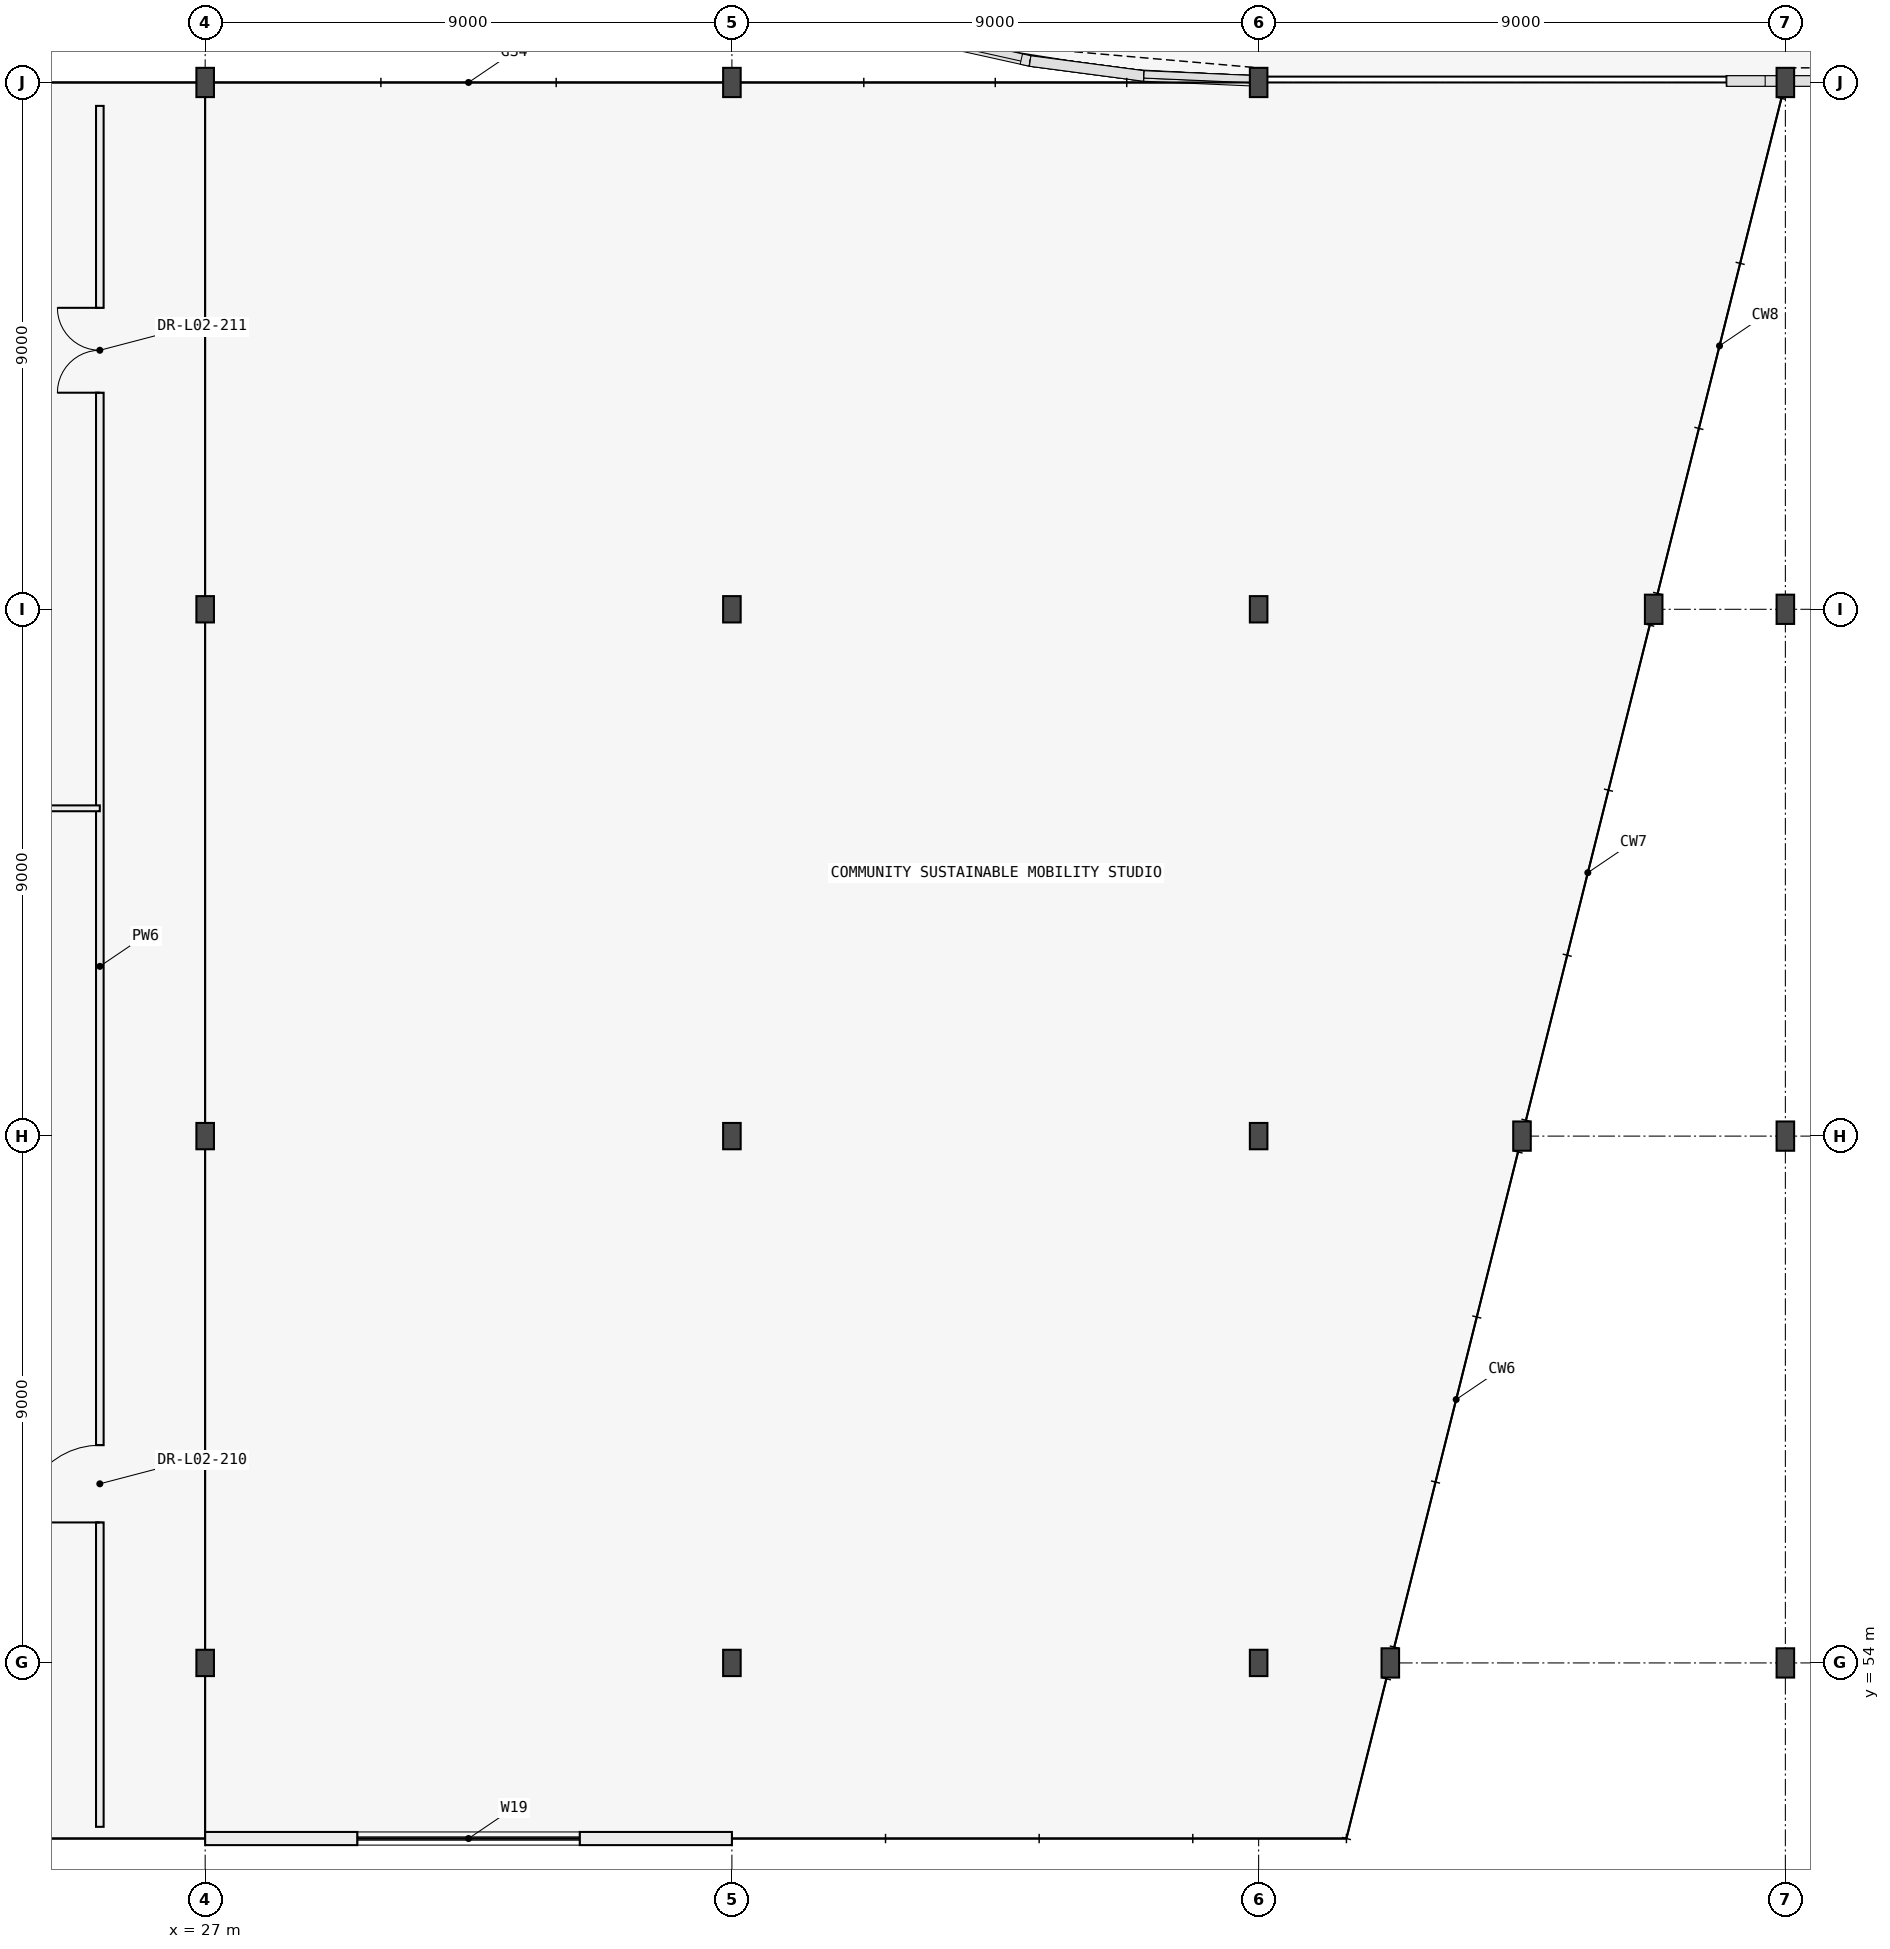
"""IFC4 building model, lengths in metres.
Left out: names, types, materials, properties, quantities, classifications, styles, units other than length and angle.
Written with IfcOpenShell. Run it as: python <this file> out.ifc"""

import sys

from ifc_helpers import new_model, si_unit, direction, frame, frame_2d, origin, origin_2d, place, context, subcontext, project, spatial, rectangle, i_section, extrude, element, fill, save


model = new_model("IFC4")
c1 = context("Model", 3, precision=1e-05, world=origin(), true_north=direction((0.0, 1.0)))
c2 = subcontext(c1, "Body", "Model", "MODEL_VIEW")
j1 = project(units=[si_unit("LENGTHUNIT", "METRE"), si_unit("PLANEANGLEUNIT", "RADIAN")], contexts=[c1])
p1 = place(None, origin())
s1 = spatial("IfcSite", under=j1, at=p1, CompositionType="ELEMENT")
p2 = place(p1, origin())
s2 = spatial("IfcBuilding", under=s1, at=p2, CompositionType="ELEMENT")
p3 = place(p2, frame((0.0, 0.0, 8.4)))
s3 = spatial("IfcBuildingStorey", under=s2, at=p3, CompositionType="ELEMENT", Elevation=8.4)
for number, where, z_axis, x_axis in (
    (1, (27.0, 54.0, 0.0), (0.0, 0.0, 1.0), (1.0, 0.0, 0.0)),
    (2, (36.0, 54.0, 0.0), (0.0, 0.0, 1.0), (1.0, 0.0, 0.0)),
    (3, (45.0, 54.0, 0.0), (0.0, 0.0, 1.0), (1.0, 0.0, 0.0)),
):
    element("IfcColumn", number, at=place(p3, frame(where, z_axis=z_axis, x_axis=x_axis)), inside=s3, PredefinedType="COLUMN", context=c2, shape_type="SweptSolid", body=[
        extrude(i_section(OverallWidth=0.3, OverallDepth=0.45, WebThickness=0.014, FlangeThickness=0.026, FilletRadius=0.027, at=origin_2d()), origin(), (0.0, 0.0, 1.0), 4.2),
    ])
p4 = place(p3, frame((47.25, 54.0, 0.0), z_axis=(0.0, 0.0, 1.0), x_axis=(1.0, 0.0, 0.0)))
e4 = element("IfcColumn", 4, at=p4, inside=s3, PredefinedType="COLUMN", context=c2, shape_type="SweptSolid", body=[
    extrude(i_section(OverallWidth=0.3, OverallDepth=0.5, WebThickness=0.014, FlangeThickness=0.028, FilletRadius=0.027, at=origin_2d()), origin(), (0.0, 0.0, 1.0), 4.2),
])
for number, where, z_axis, x_axis in (
    (5, (27.0, 63.0, 0.0), (0.0, 0.0, 1.0), (1.0, 0.0, 0.0)),
    (6, (36.0, 63.0, 0.0), (0.0, 0.0, 1.0), (1.0, 0.0, 0.0)),
    (7, (45.0, 63.0, 0.0), (0.0, 0.0, 1.0), (1.0, 0.0, 0.0)),
):
    element("IfcColumn", number, at=place(p3, frame(where, z_axis=z_axis, x_axis=x_axis)), inside=s3, PredefinedType="COLUMN", context=c2, shape_type="SweptSolid", body=[
        extrude(i_section(OverallWidth=0.3, OverallDepth=0.45, WebThickness=0.014, FlangeThickness=0.026, FilletRadius=0.027, at=origin_2d()), origin(), (0.0, 0.0, 1.0), 4.2),
    ])
p5 = place(p3, frame((49.5, 63.0, 0.0), z_axis=(0.0, 0.0, 1.0), x_axis=(1.0, 0.0, 0.0)))
e8 = element("IfcColumn", 8, at=p5, inside=s3, PredefinedType="COLUMN", context=c2, shape_type="SweptSolid", body=[
    extrude(i_section(OverallWidth=0.3, OverallDepth=0.5, WebThickness=0.014, FlangeThickness=0.028, FilletRadius=0.027, at=origin_2d()), origin(), (0.0, 0.0, 1.0), 4.2),
])
for number, where, z_axis, x_axis in (
    (9, (27.0, 72.0, 0.0), (0.0, 0.0, 1.0), (1.0, 0.0, 0.0)),
    (10, (36.0, 72.0, 0.0), (0.0, 0.0, 1.0), (1.0, 0.0, 0.0)),
    (11, (45.0, 72.0, 0.0), (0.0, 0.0, 1.0), (1.0, 0.0, 0.0)),
):
    element("IfcColumn", number, at=place(p3, frame(where, z_axis=z_axis, x_axis=x_axis)), inside=s3, PredefinedType="COLUMN", context=c2, shape_type="SweptSolid", body=[
        extrude(i_section(OverallWidth=0.3, OverallDepth=0.45, WebThickness=0.014, FlangeThickness=0.026, FilletRadius=0.027, at=origin_2d()), origin(), (0.0, 0.0, 1.0), 4.2),
    ])
for number, where, z_axis, x_axis in (
    (12, (51.75, 72.0, 0.0), (0.0, 0.0, 1.0), (1.0, 0.0, 0.0)),
    (13, (27.0, 81.0, 0.0), (0.0, 0.0, 1.0), (1.0, 0.0, 0.0)),
    (14, (36.0, 81.0, 0.0), (0.0, 0.0, 1.0), (1.0, 0.0, 0.0)),
    (15, (45.0, 81.0, 0.0), (0.0, 0.0, 1.0), (1.0, 0.0, 0.0)),
    (16, (54.0, 81.0, 0.0), (0.0, 0.0, 1.0), (1.0, 0.0, 0.0)),
    (17, (54.0, 54.0, 0.0), (0.0, 0.0, 1.0), (1.0, 0.0, 0.0)),
    (18, (54.0, 63.0, 0.0), (0.0, 0.0, 1.0), (1.0, 0.0, 0.0)),
    (19, (54.0, 72.0, 0.0), (0.0, 0.0, 1.0), (1.0, 0.0, 0.0)),
):
    element("IfcColumn", number, at=place(p3, frame(where, z_axis=z_axis, x_axis=x_axis)), inside=s3, PredefinedType="COLUMN", context=c2, shape_type="SweptSolid", body=[
        extrude(i_section(OverallWidth=0.3, OverallDepth=0.5, WebThickness=0.014, FlangeThickness=0.028, FilletRadius=0.027, at=origin_2d()), origin(), (0.0, 0.0, 1.0), 4.2),
    ])
p6 = place(p3, frame((27.0, 51.0, 0.0), z_axis=(0.0, 0.0, 1.0), x_axis=(1.0, 0.0, 0.0)))
e20 = element("IfcWall", 20, at=p6, inside=s3, PredefinedType="STANDARD", context=c2, shape_type="SweptSolid", body=[
    extrude(rectangle(XDim=9.0, YDim=0.225, at=frame_2d((4.5, 0.0))), origin(), (0.0, 0.0, 1.0), 3.935),
])
p7 = place(p6, frame((2.6, 0.0, 0.95)))
e21 = element("IfcOpeningElement", 21, at=p7, cuts=e20, PredefinedType="OPENING", context=c2, shape_type="SweptSolid", body=[
    extrude(rectangle(XDim=3.8, YDim=1.4, at=frame_2d((1.9, 0.7))), frame((0.0, 0.123, 0.0), z_axis=(0.0, -1.0, 0.0), x_axis=(1.0, 0.0, 0.0)), (0.0, 0.0, 1.0), 0.245),
])
p8 = place(p3, frame((25.2, 51.2, 0.0), z_axis=(0.0, 0.0, 1.0), x_axis=(0.0, 1.0, 0.0)))
e22 = element("IfcWall", 22, at=p8, inside=s3, PredefinedType="PARTITIONING", context=c2, shape_type="SweptSolid", body=[
    extrude(rectangle(XDim=29.4, YDim=0.13, at=frame_2d((14.7, 0.0))), origin(), (0.0, 0.0, 1.0), 3.935),
])
p9 = place(p8, frame((5.2, 0.0, 0.0)))
e23 = element("IfcOpeningElement", 23, at=p9, cuts=e22, PredefinedType="OPENING", context=c2, shape_type="SweptSolid", body=[
    extrude(rectangle(XDim=1.32, YDim=2.2, at=frame_2d((0.66, 1.1))), frame((0.0, 0.075, 0.0), z_axis=(0.0, -1.0, 0.0), x_axis=(1.0, 0.0, 0.0)), (0.0, 0.0, 1.0), 0.15),
])
p10 = place(p8, frame((24.5, 0.0, 0.0)))
e24 = element("IfcOpeningElement", 24, at=p10, cuts=e22, PredefinedType="OPENING", context=c2, shape_type="SweptSolid", body=[
    extrude(rectangle(XDim=1.45, YDim=2.22, at=frame_2d((0.725, 1.11))), frame((0.0, 0.075, 0.0), z_axis=(0.0, -1.0, 0.0), x_axis=(1.0, 0.0, 0.0)), (0.0, 0.0, 1.0), 0.15),
])
p11 = place(p3, frame((0.4, 68.6, 0.0), z_axis=(0.0, 0.0, 1.0), x_axis=(1.0, 0.0, 0.0)))
e25 = element("IfcWall", 25, at=p11, inside=s3, PredefinedType="PARTITIONING", context=c2, shape_type="SweptSolid", body=[
    extrude(rectangle(XDim=24.8, YDim=0.1, at=frame_2d((12.4, 0.0))), origin(), (0.0, 0.0, 1.0), 3.935),
])
p12 = place(p11, frame((5.8, 0.0, 0.0)))
e26 = element("IfcOpeningElement", 26, at=p12, cuts=e25, PredefinedType="OPENING", context=c2, shape_type="SweptSolid", body=[
    extrude(rectangle(XDim=1.65, YDim=2.25, at=frame_2d((0.825, 1.125))), frame((0.0, 0.06, 0.0), z_axis=(0.0, -1.0, 0.0), x_axis=(1.0, 0.0, 0.0)), (0.0, 0.0, 1.0), 0.12),
])
p13 = place(p7, origin())
e27 = element("IfcWindow", 27, at=p13, inside=s3, PartitioningType="SINGLE_PANEL", PredefinedType="WINDOW", context=c2, shape_type="SweptSolid", body=[
    extrude(rectangle(XDim=3.8, YDim=1.4, at=frame_2d((1.9, 0.7))), frame((0.0, 0.03, 0.0), z_axis=(0.0, -1.0, 0.0), x_axis=(1.0, 0.0, 0.0)), (0.0, 0.0, 1.0), 0.06),
])
fill(e21, e27)
p14 = place(p9, origin())
e28 = element("IfcDoor", 28, at=p14, inside=s3, OperationType="SINGLE_SWING_LEFT", PredefinedType="DOOR", context=c2, shape_type="SweptSolid", body=[
    extrude(rectangle(XDim=1.32, YDim=2.2, at=frame_2d((0.66, 1.1))), frame((0.0, 0.025, 0.0), z_axis=(0.0, -1.0, 0.0), x_axis=(1.0, 0.0, 0.0)), (0.0, 0.0, 1.0), 0.05),
])
fill(e23, e28)
p15 = place(p10, origin())
e29 = element("IfcDoor", 29, at=p15, inside=s3, OperationType="DOUBLE_DOOR_SINGLE_SWING", PredefinedType="DOOR", context=c2, shape_type="SweptSolid", body=[
    extrude(rectangle(XDim=1.45, YDim=2.22, at=frame_2d((0.725, 1.11))), frame((0.0, 0.025, 0.0), z_axis=(0.0, -1.0, 0.0), x_axis=(1.0, 0.0, 0.0)), (0.0, 0.0, 1.0), 0.05),
])
fill(e24, e29)
save(model, sys.argv[1])
